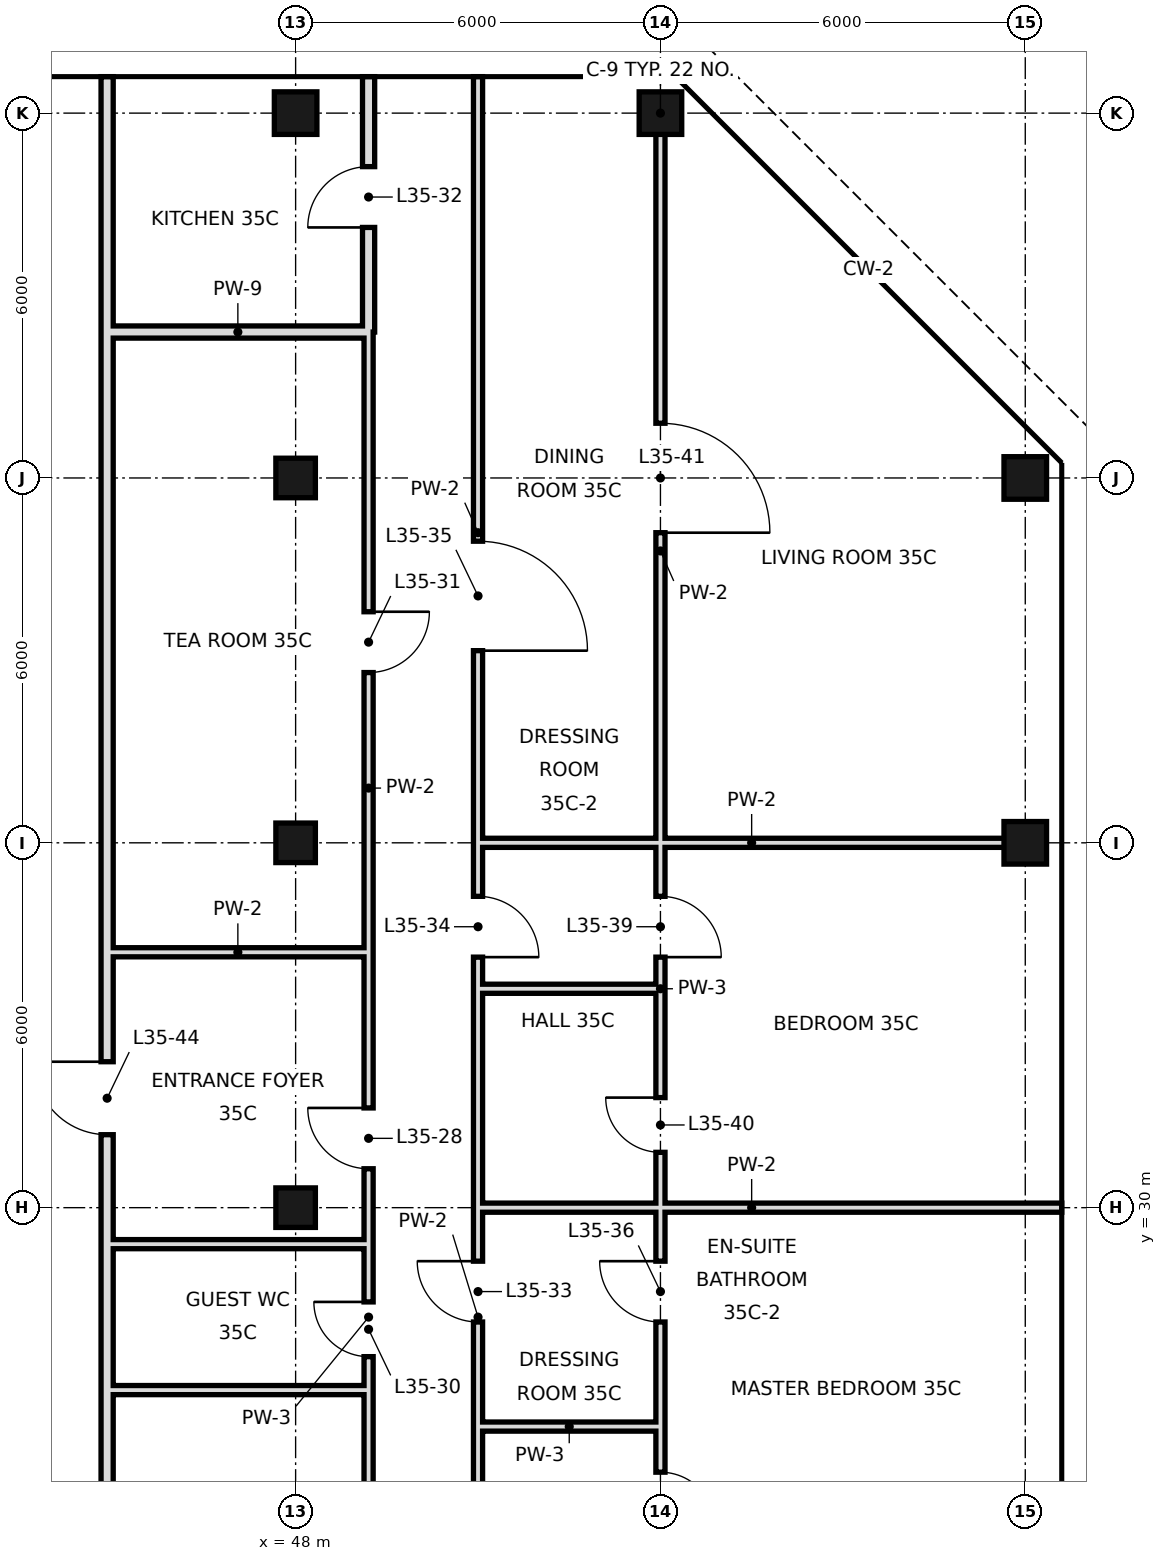
"""IFC4 building model, lengths in metres.
Left out: names, types, materials, properties, quantities, classifications, styles, units other than length and angle.
Written with IfcOpenShell. Run it as: python <this file> out.ifc"""

import sys

from ifc_helpers import new_model, si_unit, direction, frame, frame_2d, origin, origin_2d, place, context, subcontext, project, spatial, rectangle, hollow_rectangle, extrude, element, fill, save


model = new_model("IFC4")
c1 = context("Model", 3, precision=1e-05, world=origin(), true_north=direction((0.0, 1.0)))
c2 = subcontext(c1, "Body", "Model", "MODEL_VIEW")
j1 = project(units=[si_unit("LENGTHUNIT", "METRE"), si_unit("PLANEANGLEUNIT", "RADIAN")], contexts=[c1])
p1 = place(None, origin())
s1 = spatial("IfcSite", under=j1, at=p1, CompositionType="ELEMENT")
p2 = place(p1, origin())
s2 = spatial("IfcBuilding", under=s1, at=p2, CompositionType="ELEMENT")
p3 = place(p2, frame((0.0, 0.0, 154.6)))
s3 = spatial("IfcBuildingStorey", under=s2, at=p3, CompositionType="ELEMENT", Elevation=154.6)
for number, where, z_axis, x_axis in (
    (1, (48.0, 30.0, 0.0), (0.0, 0.0, 1.0), (1.0, 0.0, 0.0)),
    (2, (48.0, 36.0, 0.0), (0.0, 0.0, 1.0), (1.0, 0.0, 0.0)),
    (3, (48.0, 42.0, 0.0), (0.0, 0.0, 1.0), (1.0, 0.0, 0.0)),
):
    element("IfcColumn", number, at=place(p3, frame(where, z_axis=z_axis, x_axis=x_axis)), inside=s3, PredefinedType="COLUMN", context=c2, shape_type="SweptSolid", body=[
        extrude(hollow_rectangle(XDim=0.65, YDim=0.65, WallThickness=0.032, at=origin_2d()), origin(), (0.0, 0.0, 1.0), 3.6),
    ])
for number, where, z_axis, x_axis in (
    (4, (48.0, 48.0, 0.0), (0.0, 0.0, 1.0), (1.0, 0.0, 0.0)),
    (5, (54.0, 48.0, 0.0), (0.0, 0.0, 1.0), (1.0, 0.0, 0.0)),
    (6, (60.0, 36.0, 0.0), (0.0, 0.0, 1.0), (1.0, 0.0, 0.0)),
    (7, (60.0, 42.0, 0.0), (0.0, 0.0, 1.0), (1.0, 0.0, 0.0)),
):
    element("IfcColumn", number, at=place(p3, frame(where, z_axis=z_axis, x_axis=x_axis)), inside=s3, PredefinedType="COLUMN", context=c2, shape_type="SweptSolid", body=[
        extrude(hollow_rectangle(XDim=0.7, YDim=0.7, WallThickness=0.036, at=origin_2d()), origin(), (0.0, 0.0, 1.0), 3.6),
    ])
p4 = place(p3, frame((44.9, 18.7, 0.0), z_axis=(0.0, 0.0, 1.0), x_axis=(0.0, 1.0, 0.0)))
e8 = element("IfcWall", 8, at=p4, inside=s3, PredefinedType="SOLIDWALL", context=c2, shape_type="SweptSolid", body=[
    extrude(rectangle(XDim=25.7, YDim=0.2, at=frame_2d((12.85, 0.0))), origin(), (0.0, 0.0, 1.0), 2.97),
])
p5 = place(p4, frame((12.5, 0.0, 0.0)))
e9 = element("IfcOpeningElement", 9, at=p5, cuts=e8, PredefinedType="OPENING", context=c2, shape_type="SweptSolid", body=[
    extrude(rectangle(XDim=1.2, YDim=2.4, at=frame_2d((0.6, 1.2))), frame((0.0, 0.11, 0.0), z_axis=(0.0, -1.0, 0.0), x_axis=(1.0, 0.0, 0.0)), (0.0, 0.0, 1.0), 0.22),
])
p6 = place(p3, frame((44.9, 44.4, 0.0), z_axis=(0.0, 0.0, 1.0), x_axis=(0.0, 1.0, 0.0)))
e10 = element("IfcWall", 10, at=p6, inside=s3, PredefinedType="SOLIDWALL", context=c2, shape_type="SweptSolid", body=[
    extrude(rectangle(XDim=4.2, YDim=0.2, at=frame_2d((2.1, 0.0))), origin(), (0.0, 0.0, 1.0), 2.72),
])
p7 = place(p3, frame((49.2, 44.4, 0.0), z_axis=(0.0, 0.0, 1.0), x_axis=(0.0, 1.0, 0.0)))
e11 = element("IfcWall", 11, at=p7, inside=s3, PredefinedType="SOLIDWALL", context=c2, shape_type="SweptSolid", body=[
    extrude(rectangle(XDim=4.2, YDim=0.2, at=frame_2d((2.1, 0.0))), origin(), (0.0, 0.0, 1.0), 2.97),
])
p8 = place(p7, frame((1.72, 0.0, 0.0)))
e12 = element("IfcOpeningElement", 12, at=p8, cuts=e11, PredefinedType="OPENING", context=c2, shape_type="SweptSolid", body=[
    extrude(rectangle(XDim=1.0, YDim=2.4, at=frame_2d((0.5, 1.2))), frame((0.0, 0.11, 0.0), z_axis=(0.0, -1.0, 0.0), x_axis=(1.0, 0.0, 0.0)), (0.0, 0.0, 1.0), 0.22),
])
p9 = place(p3, frame((49.2, 10.8, 0.0), z_axis=(0.0, 0.0, 1.0), x_axis=(0.0, 1.0, 0.0)))
e13 = element("IfcWall", 13, at=p9, inside=s3, PredefinedType="PARTITIONING", context=c2, shape_type="SweptSolid", body=[
    extrude(rectangle(XDim=16.2, YDim=0.15, at=frame_2d((8.1, 0.0))), origin(), (0.0, 0.0, 1.0), 3.42),
])
p10 = place(p9, frame((11.2, 0.0, 0.0)))
e14 = element("IfcOpeningElement", 14, at=p10, cuts=e13, PredefinedType="OPENING", context=c2, shape_type="SweptSolid", body=[
    extrude(rectangle(XDim=1.0, YDim=2.4, at=frame_2d((0.5, 1.2))), frame((0.0, 0.085, 0.0), z_axis=(0.0, -1.0, 0.0), x_axis=(1.0, 0.0, 0.0)), (0.0, 0.0, 1.0), 0.17),
])
p11 = place(p3, frame((49.2, 29.4, 0.0), z_axis=(0.0, 0.0, 1.0), x_axis=(0.0, 1.0, 0.0)))
e15 = element("IfcWall", 15, at=p11, inside=s3, PredefinedType="PARTITIONING", context=c2, shape_type="SweptSolid", body=[
    extrude(rectangle(XDim=15.0, YDim=0.15, at=frame_2d((7.5, 0.0))), origin(), (0.0, 0.0, 1.0), 3.42),
])
p12 = place(p11, frame((1.24, 0.0, 0.0)))
e16 = element("IfcOpeningElement", 16, at=p12, cuts=e15, PredefinedType="OPENING", context=c2, shape_type="SweptSolid", body=[
    extrude(rectangle(XDim=1.0, YDim=2.4, at=frame_2d((0.5, 1.2))), frame((0.0, 0.085, 0.0), z_axis=(0.0, -1.0, 0.0), x_axis=(1.0, 0.0, 0.0)), (0.0, 0.0, 1.0), 0.17),
])
p13 = place(p11, frame((9.4, 0.0, 0.0)))
e17 = element("IfcOpeningElement", 17, at=p13, cuts=e15, PredefinedType="OPENING", context=c2, shape_type="SweptSolid", body=[
    extrude(rectangle(XDim=1.0, YDim=2.4, at=frame_2d((0.5, 1.2))), frame((0.0, 0.085, 0.0), z_axis=(0.0, -1.0, 0.0), x_axis=(1.0, 0.0, 0.0)), (0.0, 0.0, 1.0), 0.17),
])
p14 = place(p3, frame((49.2, 27.0, 0.0), z_axis=(0.0, 0.0, 1.0), x_axis=(0.0, 1.0, 0.0)))
e18 = element("IfcWall", 18, at=p14, inside=s3, PredefinedType="PARTITIONING", context=c2, shape_type="SweptSolid", body=[
    extrude(rectangle(XDim=2.4, YDim=0.15, at=frame_2d((1.2, 0.0))), origin(), (0.0, 0.0, 1.0), 3.42),
])
p15 = place(p14, frame((0.55, 0.0, 0.0)))
e19 = element("IfcOpeningElement", 19, at=p15, cuts=e18, PredefinedType="OPENING", context=c2, shape_type="SweptSolid", body=[
    extrude(rectangle(XDim=0.9, YDim=2.4, at=frame_2d((0.45, 1.2))), frame((0.0, 0.085, 0.0), z_axis=(0.0, -1.0, 0.0), x_axis=(1.0, 0.0, 0.0)), (0.0, 0.0, 1.0), 0.17),
])
p16 = place(p3, frame((51.0, 26.4, 0.0), z_axis=(0.0, 0.0, 1.0), x_axis=(0.0, 1.0, 0.0)))
e20 = element("IfcWall", 20, at=p16, inside=s3, PredefinedType="PARTITIONING", context=c2, shape_type="SweptSolid", body=[
    extrude(rectangle(XDim=3.6, YDim=0.15, at=frame_2d((1.8, 0.0))), origin(), (0.0, 0.0, 1.0), 3.42),
])
p17 = place(p16, frame((1.72, 0.0, 0.0)))
e21 = element("IfcOpeningElement", 21, at=p17, cuts=e20, PredefinedType="OPENING", context=c2, shape_type="SweptSolid", body=[
    extrude(rectangle(XDim=1.0, YDim=2.4, at=frame_2d((0.5, 1.2))), frame((0.0, 0.085, 0.0), z_axis=(0.0, -1.0, 0.0), x_axis=(1.0, 0.0, 0.0)), (0.0, 0.0, 1.0), 0.17),
])
p18 = place(p3, frame((51.0, 33.6, 0.0), z_axis=(0.0, 0.0, 1.0), x_axis=(0.0, 1.0, 0.0)))
e22 = element("IfcWall", 22, at=p18, inside=s3, PredefinedType="PARTITIONING", context=c2, shape_type="SweptSolid", body=[
    extrude(rectangle(XDim=15.0, YDim=0.15, at=frame_2d((7.5, 0.0))), origin(), (0.0, 0.0, 1.0), 3.42),
])
p19 = place(p18, frame((0.52, 0.0, 0.0)))
e23 = element("IfcOpeningElement", 23, at=p19, cuts=e22, PredefinedType="OPENING", context=c2, shape_type="SweptSolid", body=[
    extrude(rectangle(XDim=1.0, YDim=2.4, at=frame_2d((0.5, 1.2))), frame((0.0, 0.085, 0.0), z_axis=(0.0, -1.0, 0.0), x_axis=(1.0, 0.0, 0.0)), (0.0, 0.0, 1.0), 0.17),
])
p20 = place(p18, frame((5.56, 0.0, 0.0)))
e24 = element("IfcOpeningElement", 24, at=p20, cuts=e22, PredefinedType="OPENING", context=c2, shape_type="SweptSolid", body=[
    extrude(rectangle(XDim=1.8, YDim=2.4, at=frame_2d((0.9, 1.2))), frame((0.0, 0.085, 0.0), z_axis=(0.0, -1.0, 0.0), x_axis=(1.0, 0.0, 0.0)), (0.0, 0.0, 1.0), 0.17),
])
p21 = place(p3, frame((51.0, 18.0, 0.0), z_axis=(0.0, 0.0, 1.0), x_axis=(0.0, 1.0, 0.0)))
e25 = element("IfcWall", 25, at=p21, inside=s3, PredefinedType="PARTITIONING", context=c2, shape_type="SweptSolid", body=[
    extrude(rectangle(XDim=8.4, YDim=0.15, at=frame_2d((4.2, 0.0))), origin(), (0.0, 0.0, 1.0), 3.42),
])
p22 = place(p3, frame((51.0, 30.0, 0.0), z_axis=(0.0, 0.0, 1.0), x_axis=(0.0, 1.0, 0.0)))
e26 = element("IfcWall", 26, at=p22, inside=s3, PredefinedType="PARTITIONING", context=c2, shape_type="SweptSolid", body=[
    extrude(rectangle(XDim=3.6, YDim=0.15, at=frame_2d((1.8, 0.0))), origin(), (0.0, 0.0, 1.0), 3.42),
])
p23 = place(p3, frame((54.0, 26.4, 0.0), z_axis=(0.0, 0.0, 1.0), x_axis=(0.0, 1.0, 0.0)))
e27 = element("IfcWall", 27, at=p23, inside=s3, PredefinedType="PARTITIONING", context=c2, shape_type="SweptSolid", body=[
    extrude(rectangle(XDim=3.6, YDim=0.15, at=frame_2d((1.8, 0.0))), origin(), (0.0, 0.0, 1.0), 3.42),
])
p24 = place(p23, frame((1.72, 0.0, 0.0)))
e28 = element("IfcOpeningElement", 28, at=p24, cuts=e27, PredefinedType="OPENING", context=c2, shape_type="SweptSolid", body=[
    extrude(rectangle(XDim=1.0, YDim=2.4, at=frame_2d((0.5, 1.2))), frame((0.0, 0.085, 0.0), z_axis=(0.0, -1.0, 0.0), x_axis=(1.0, 0.0, 0.0)), (0.0, 0.0, 1.0), 0.17),
])
p25 = place(p3, frame((54.0, 33.6, 0.0), z_axis=(0.0, 0.0, 1.0), x_axis=(0.0, 1.0, 0.0)))
e29 = element("IfcWall", 29, at=p25, inside=s3, PredefinedType="PARTITIONING", context=c2, shape_type="SweptSolid", body=[
    extrude(rectangle(XDim=14.4, YDim=0.15, at=frame_2d((7.2, 0.0))), origin(), (0.0, 0.0, 1.0), 3.42),
])
p26 = place(p25, frame((0.52, 0.0, 0.0)))
e30 = element("IfcOpeningElement", 30, at=p26, cuts=e29, PredefinedType="OPENING", context=c2, shape_type="SweptSolid", body=[
    extrude(rectangle(XDim=1.0, YDim=2.4, at=frame_2d((0.5, 1.2))), frame((0.0, 0.085, 0.0), z_axis=(0.0, -1.0, 0.0), x_axis=(1.0, 0.0, 0.0)), (0.0, 0.0, 1.0), 0.17),
])
p27 = place(p25, frame((7.5, 0.0, 0.0)))
e31 = element("IfcOpeningElement", 31, at=p27, cuts=e29, PredefinedType="OPENING", context=c2, shape_type="SweptSolid", body=[
    extrude(rectangle(XDim=1.8, YDim=2.4, at=frame_2d((0.9, 1.2))), frame((0.0, 0.085, 0.0), z_axis=(0.0, -1.0, 0.0), x_axis=(1.0, 0.0, 0.0)), (0.0, 0.0, 1.0), 0.17),
])
p28 = place(p3, frame((54.0, 18.0, 0.0), z_axis=(0.0, 0.0, 1.0), x_axis=(0.0, 1.0, 0.0)))
e32 = element("IfcWall", 32, at=p28, inside=s3, PredefinedType="PARTITIONING", context=c2, shape_type="SweptSolid", body=[
    extrude(rectangle(XDim=8.4, YDim=0.15, at=frame_2d((4.2, 0.0))), origin(), (0.0, 0.0, 1.0), 3.42),
])
p29 = place(p28, frame((6.75, 0.0, 0.0)))
e33 = element("IfcOpeningElement", 33, at=p29, cuts=e32, PredefinedType="OPENING", context=c2, shape_type="SweptSolid", body=[
    extrude(rectangle(XDim=0.9, YDim=2.4, at=frame_2d((0.45, 1.2))), frame((0.0, 0.085, 0.0), z_axis=(0.0, -1.0, 0.0), x_axis=(1.0, 0.0, 0.0)), (0.0, 0.0, 1.0), 0.17),
])
p30 = place(p3, frame((54.0, 30.0, 0.0), z_axis=(0.0, 0.0, 1.0), x_axis=(0.0, 1.0, 0.0)))
e34 = element("IfcWall", 34, at=p30, inside=s3, PredefinedType="PARTITIONING", context=c2, shape_type="SweptSolid", body=[
    extrude(rectangle(XDim=3.6, YDim=0.15, at=frame_2d((1.8, 0.0))), origin(), (0.0, 0.0, 1.0), 3.42),
])
p31 = place(p30, frame((0.91, 0.0, 0.0)))
e35 = element("IfcOpeningElement", 35, at=p31, cuts=e34, PredefinedType="OPENING", context=c2, shape_type="SweptSolid", body=[
    extrude(rectangle(XDim=0.9, YDim=2.4, at=frame_2d((0.45, 1.2))), frame((0.0, 0.085, 0.0), z_axis=(0.0, -1.0, 0.0), x_axis=(1.0, 0.0, 0.0)), (0.0, 0.0, 1.0), 0.17),
])
p32 = place(p3, frame((51.0, 26.4, 0.0), z_axis=(0.0, 0.0, 1.0), x_axis=(1.0, 0.0, 0.0)))
e36 = element("IfcWall", 36, at=p32, inside=s3, PredefinedType="PARTITIONING", context=c2, shape_type="SweptSolid", body=[
    extrude(rectangle(XDim=3.0, YDim=0.15, at=frame_2d((1.5, 0.0))), origin(), (0.0, 0.0, 1.0), 3.42),
])
for number, where, z_axis, x_axis in (
    (37, (44.9, 27.0, 0.0), (0.0, 0.0, 1.0), (1.0, 0.0, 0.0)),
    (38, (44.9, 29.4, 0.0), (0.0, 0.0, 1.0), (1.0, 0.0, 0.0)),
):
    element("IfcWall", number, at=place(p3, frame(where, z_axis=z_axis, x_axis=x_axis)), inside=s3, PredefinedType="PARTITIONING", context=c2, shape_type="SweptSolid", body=[
        extrude(rectangle(XDim=4.3, YDim=0.15, at=frame_2d((2.15, 0.0))), origin(), (0.0, 0.0, 1.0), 3.42),
    ])
p33 = place(p3, frame((54.0, 30.0, 0.0), z_axis=(0.0, 0.0, 1.0), x_axis=(1.0, 0.0, 0.0)))
e39 = element("IfcWall", 39, at=p33, inside=s3, PredefinedType="PARTITIONING", context=c2, shape_type="SweptSolid", body=[
    extrude(rectangle(XDim=6.6, YDim=0.15, at=frame_2d((3.3, 0.0))), origin(), (0.0, 0.0, 1.0), 2.72),
])
p34 = place(p3, frame((51.0, 30.0, 0.0), z_axis=(0.0, 0.0, 1.0), x_axis=(1.0, 0.0, 0.0)))
e40 = element("IfcWall", 40, at=p34, inside=s3, PredefinedType="PARTITIONING", context=c2, shape_type="SweptSolid", body=[
    extrude(rectangle(XDim=3.0, YDim=0.15, at=frame_2d((1.5, 0.0))), origin(), (0.0, 0.0, 1.0), 2.72),
])
p35 = place(p3, frame((51.0, 33.6, 0.0), z_axis=(0.0, 0.0, 1.0), x_axis=(1.0, 0.0, 0.0)))
e41 = element("IfcWall", 41, at=p35, inside=s3, PredefinedType="PARTITIONING", context=c2, shape_type="SweptSolid", body=[
    extrude(rectangle(XDim=3.0, YDim=0.15, at=frame_2d((1.5, 0.0))), origin(), (0.0, 0.0, 1.0), 3.42),
])
p36 = place(p3, frame((44.9, 34.2, 0.0), z_axis=(0.0, 0.0, 1.0), x_axis=(1.0, 0.0, 0.0)))
e42 = element("IfcWall", 42, at=p36, inside=s3, PredefinedType="PARTITIONING", context=c2, shape_type="SweptSolid", body=[
    extrude(rectangle(XDim=4.3, YDim=0.15, at=frame_2d((2.15, 0.0))), origin(), (0.0, 0.0, 1.0), 3.42),
])
p37 = place(p3, frame((51.0, 36.0, 0.0), z_axis=(0.0, 0.0, 1.0), x_axis=(1.0, 0.0, 0.0)))
e43 = element("IfcWall", 43, at=p37, inside=s3, PredefinedType="PARTITIONING", context=c2, shape_type="SweptSolid", body=[
    extrude(rectangle(XDim=9.0, YDim=0.15, at=frame_2d((4.5, 0.0))), origin(), (0.0, 0.0, 1.0), 2.72),
])
p38 = place(p3, frame((44.9, 44.4, 0.0), z_axis=(0.0, 0.0, 1.0), x_axis=(1.0, 0.0, 0.0)))
e44 = element("IfcWall", 44, at=p38, inside=s3, PredefinedType="SOLIDWALL", context=c2, shape_type="SweptSolid", body=[
    extrude(rectangle(XDim=4.3, YDim=0.2, at=frame_2d((2.15, 0.0))), origin(), (0.0, 0.0, 1.0), 2.97),
])
p39 = place(p12, frame((1.0, 0.0, 0.0), z_axis=(0.0, 0.0, 1.0), x_axis=(-1.0, 0.0, 0.0)))
e45 = element("IfcDoor", 45, at=p39, inside=s3, OperationType="SINGLE_SWING_LEFT", PredefinedType="DOOR", context=c2, shape_type="SweptSolid", body=[
    extrude(rectangle(XDim=1.0, YDim=2.4, at=frame_2d((0.5, 1.2))), frame((0.0, 0.025, 0.0), z_axis=(0.0, -1.0, 0.0), x_axis=(1.0, 0.0, 0.0)), (0.0, 0.0, 1.0), 0.05),
])
fill(e16, e45)
p40 = place(p15, frame((0.9, 0.0, 0.0), z_axis=(0.0, 0.0, 1.0), x_axis=(-1.0, 0.0, 0.0)))
e46 = element("IfcDoor", 46, at=p40, inside=s3, OperationType="SINGLE_SWING_LEFT", PredefinedType="DOOR", context=c2, shape_type="SweptSolid", body=[
    extrude(rectangle(XDim=0.9, YDim=2.4, at=frame_2d((0.45, 1.2))), frame((0.0, 0.025, 0.0), z_axis=(0.0, -1.0, 0.0), x_axis=(1.0, 0.0, 0.0)), (0.0, 0.0, 1.0), 0.05),
])
fill(e19, e46)
p41 = place(p13, origin())
e47 = element("IfcDoor", 47, at=p41, inside=s3, OperationType="SINGLE_SWING_RIGHT", PredefinedType="DOOR", context=c2, shape_type="SweptSolid", body=[
    extrude(rectangle(XDim=1.0, YDim=2.4, at=frame_2d((0.5, 1.2))), frame((0.0, 0.025, 0.0), z_axis=(0.0, -1.0, 0.0), x_axis=(1.0, 0.0, 0.0)), (0.0, 0.0, 1.0), 0.05),
])
fill(e17, e47)
p42 = place(p8, origin())
e48 = element("IfcDoor", 48, at=p42, inside=s3, OperationType="SINGLE_SWING_LEFT", PredefinedType="DOOR", context=c2, shape_type="SweptSolid", body=[
    extrude(rectangle(XDim=1.0, YDim=2.4, at=frame_2d((0.5, 1.2))), frame((0.0, 0.025, 0.0), z_axis=(0.0, -1.0, 0.0), x_axis=(1.0, 0.0, 0.0)), (0.0, 0.0, 1.0), 0.05),
])
fill(e12, e48)
p43 = place(p17, frame((1.0, 0.0, 0.0), z_axis=(0.0, 0.0, 1.0), x_axis=(-1.0, 0.0, 0.0)))
e49 = element("IfcDoor", 49, at=p43, inside=s3, OperationType="SINGLE_SWING_LEFT", PredefinedType="DOOR", context=c2, shape_type="SweptSolid", body=[
    extrude(rectangle(XDim=1.0, YDim=2.4, at=frame_2d((0.5, 1.2))), frame((0.0, 0.025, 0.0), z_axis=(0.0, -1.0, 0.0), x_axis=(1.0, 0.0, 0.0)), (0.0, 0.0, 1.0), 0.05),
])
fill(e21, e49)
p44 = place(p19, frame((1.0, 0.0, 0.0), z_axis=(0.0, 0.0, 1.0), x_axis=(-1.0, 0.0, 0.0)))
e50 = element("IfcDoor", 50, at=p44, inside=s3, OperationType="SINGLE_SWING_RIGHT", PredefinedType="DOOR", context=c2, shape_type="SweptSolid", body=[
    extrude(rectangle(XDim=1.0, YDim=2.4, at=frame_2d((0.5, 1.2))), frame((0.0, 0.025, 0.0), z_axis=(0.0, -1.0, 0.0), x_axis=(1.0, 0.0, 0.0)), (0.0, 0.0, 1.0), 0.05),
])
fill(e23, e50)
p45 = place(p20, frame((1.8, 0.0, 0.0), z_axis=(0.0, 0.0, 1.0), x_axis=(-1.0, 0.0, 0.0)))
e51 = element("IfcDoor", 51, at=p45, inside=s3, OperationType="SINGLE_SWING_RIGHT", PredefinedType="DOOR", context=c2, shape_type="SweptSolid", body=[
    extrude(rectangle(XDim=1.8, YDim=2.4, at=frame_2d((0.9, 1.2))), frame((0.0, 0.025, 0.0), z_axis=(0.0, -1.0, 0.0), x_axis=(1.0, 0.0, 0.0)), (0.0, 0.0, 1.0), 0.05),
])
fill(e24, e51)
p46 = place(p24, frame((1.0, 0.0, 0.0), z_axis=(0.0, 0.0, 1.0), x_axis=(-1.0, 0.0, 0.0)))
e52 = element("IfcDoor", 52, at=p46, inside=s3, OperationType="SINGLE_SWING_LEFT", PredefinedType="DOOR", context=c2, shape_type="SweptSolid", body=[
    extrude(rectangle(XDim=1.0, YDim=2.4, at=frame_2d((0.5, 1.2))), frame((0.0, 0.025, 0.0), z_axis=(0.0, -1.0, 0.0), x_axis=(1.0, 0.0, 0.0)), (0.0, 0.0, 1.0), 0.05),
])
fill(e28, e52)
p47 = place(p29, frame((0.9, 0.0, 0.0), z_axis=(0.0, 0.0, 1.0), x_axis=(-1.0, 0.0, 0.0)))
e53 = element("IfcDoor", 53, at=p47, inside=s3, OperationType="SINGLE_SWING_RIGHT", PredefinedType="DOOR", context=c2, shape_type="SweptSolid", body=[
    extrude(rectangle(XDim=0.9, YDim=2.4, at=frame_2d((0.45, 1.2))), frame((0.0, 0.025, 0.0), z_axis=(0.0, -1.0, 0.0), x_axis=(1.0, 0.0, 0.0)), (0.0, 0.0, 1.0), 0.05),
])
fill(e33, e53)
p48 = place(p26, frame((1.0, 0.0, 0.0), z_axis=(0.0, 0.0, 1.0), x_axis=(-1.0, 0.0, 0.0)))
e54 = element("IfcDoor", 54, at=p48, inside=s3, OperationType="SINGLE_SWING_RIGHT", PredefinedType="DOOR", context=c2, shape_type="SweptSolid", body=[
    extrude(rectangle(XDim=1.0, YDim=2.4, at=frame_2d((0.5, 1.2))), frame((0.0, 0.025, 0.0), z_axis=(0.0, -1.0, 0.0), x_axis=(1.0, 0.0, 0.0)), (0.0, 0.0, 1.0), 0.05),
])
fill(e30, e54)
p49 = place(p31, frame((0.9, 0.0, 0.0), z_axis=(0.0, 0.0, 1.0), x_axis=(-1.0, 0.0, 0.0)))
e55 = element("IfcDoor", 55, at=p49, inside=s3, OperationType="SINGLE_SWING_LEFT", PredefinedType="DOOR", context=c2, shape_type="SweptSolid", body=[
    extrude(rectangle(XDim=0.9, YDim=2.4, at=frame_2d((0.45, 1.2))), frame((0.0, 0.025, 0.0), z_axis=(0.0, -1.0, 0.0), x_axis=(1.0, 0.0, 0.0)), (0.0, 0.0, 1.0), 0.05),
])
fill(e35, e55)
p50 = place(p27, frame((1.8, 0.0, 0.0), z_axis=(0.0, 0.0, 1.0), x_axis=(-1.0, 0.0, 0.0)))
e56 = element("IfcDoor", 56, at=p50, inside=s3, OperationType="SINGLE_SWING_RIGHT", PredefinedType="DOOR", context=c2, shape_type="SweptSolid", body=[
    extrude(rectangle(XDim=1.8, YDim=2.4, at=frame_2d((0.9, 1.2))), frame((0.0, 0.025, 0.0), z_axis=(0.0, -1.0, 0.0), x_axis=(1.0, 0.0, 0.0)), (0.0, 0.0, 1.0), 0.05),
])
fill(e31, e56)
p51 = place(p5, frame((1.2, 0.0, 0.0), z_axis=(0.0, 0.0, 1.0), x_axis=(-1.0, 0.0, 0.0)))
e57 = element("IfcDoor", 57, at=p51, inside=s3, OperationType="SINGLE_SWING_LEFT", PredefinedType="DOOR", context=c2, shape_type="SweptSolid", body=[
    extrude(rectangle(XDim=1.2, YDim=2.4, at=frame_2d((0.6, 1.2))), frame((0.0, 0.025, 0.0), z_axis=(0.0, -1.0, 0.0), x_axis=(1.0, 0.0, 0.0)), (0.0, 0.0, 1.0), 0.05),
])
fill(e9, e57)
save(model, sys.argv[1])
